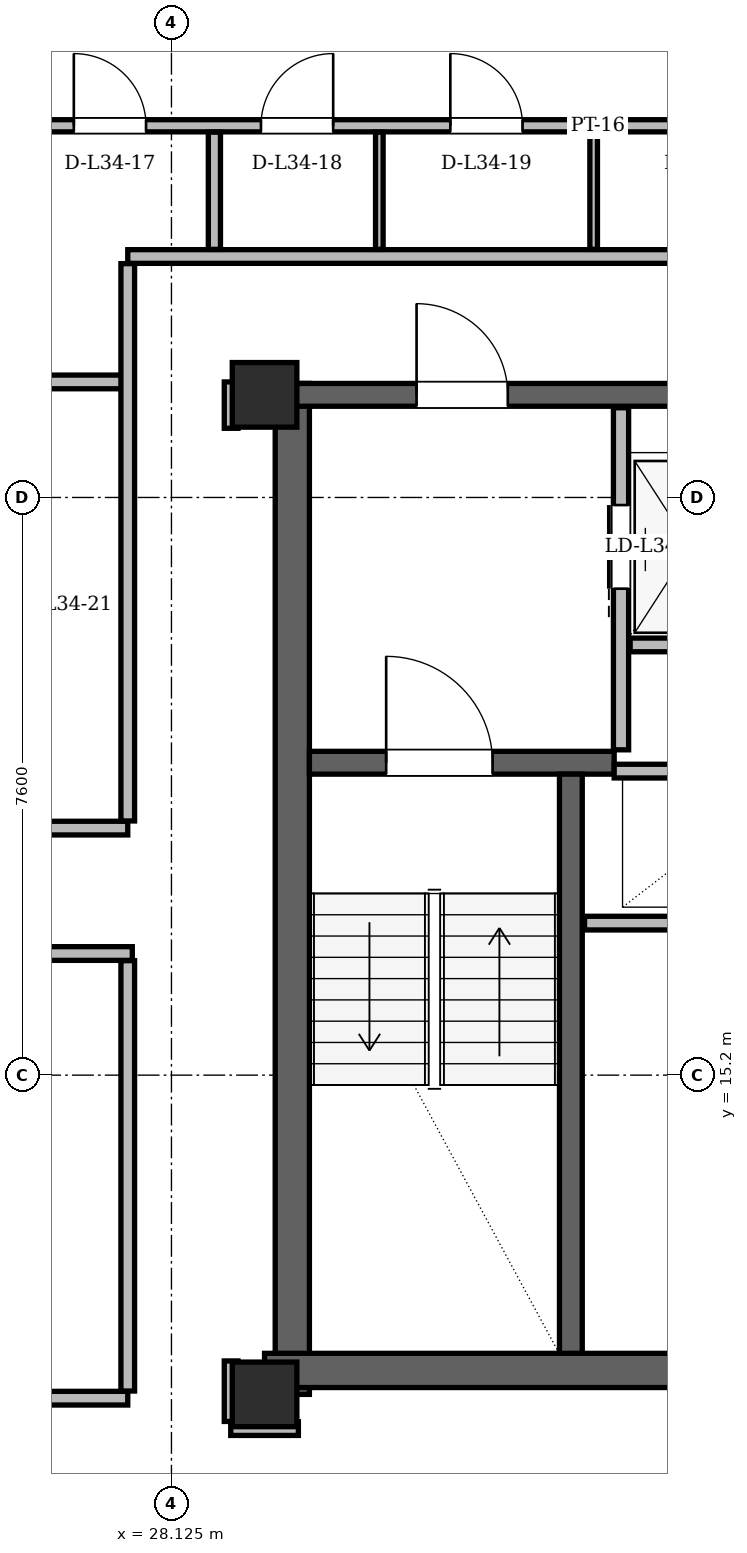
"""IFC4 building model, lengths in metres.
Left out: names, types, materials, properties, quantities, classifications, styles, units other than length and angle.
Written with IfcOpenShell. Run it as: python <this file> out.ifc"""

import sys

from ifc_helpers import new_model, si_unit, direction, frame, frame_2d, origin, origin_2d, place, context, subcontext, project, spatial, rectangle, hollow_rectangle, extrude, element, fill, save


model = new_model("IFC4")
c1 = context("Model", 3, precision=1e-05, world=origin(), true_north=direction((0.0, 1.0)))
c2 = subcontext(c1, "Body", "Model", "MODEL_VIEW")
j1 = project(units=[si_unit("LENGTHUNIT", "METRE"), si_unit("PLANEANGLEUNIT", "RADIAN")], contexts=[c1])
p1 = place(None, origin())
s1 = spatial("IfcSite", under=j1, at=p1, CompositionType="ELEMENT")
p2 = place(p1, origin())
s2 = spatial("IfcBuilding", under=s1, at=p2, CompositionType="ELEMENT")
p3 = place(p2, frame((0.0, 0.0, 130.2)))
s3 = spatial("IfcBuildingStorey", under=s2, at=p3, CompositionType="ELEMENT", Elevation=130.2)
for number, where, z_axis, x_axis in (
    (1, (29.35, 11.0, 0.0), (0.0, 0.0, 1.0), (1.0, 0.0, 0.0)),
    (2, (29.35, 24.15, 0.0), (0.0, 0.0, 1.0), (1.0, 0.0, 0.0)),
):
    element("IfcColumn", number, at=place(p3, frame(where, z_axis=z_axis, x_axis=x_axis)), inside=s3, PredefinedType="COLUMN", context=c2, shape_type="SweptSolid", body=[
        extrude(hollow_rectangle(XDim=0.85, YDim=0.85, WallThickness=0.07, at=origin_2d()), origin(), (0.0, 0.0, 1.0), 3.6),
    ])
p4 = place(p3, frame((29.715, 11.0, 0.0), z_axis=(0.0, 0.0, 1.0), x_axis=(0.0, 1.0, 0.0)))
e3 = element("IfcWall", 3, at=p4, inside=s3, PredefinedType="SHEAR", context=c2, shape_type="SweptSolid", body=[
    extrude(rectangle(XDim=13.3, YDim=0.45, at=frame_2d((6.65, 0.0))), origin(), (0.0, 0.0, 1.0), 3.34),
])
p5 = place(p3, frame((29.35, 11.315, 0.0), z_axis=(0.0, 0.0, 1.0), x_axis=(1.0, 0.0, 0.0)))
e4 = element("IfcWall", 4, at=p5, inside=s3, PredefinedType="SHEAR", context=c2, shape_type="SweptSolid", body=[
    extrude(rectangle(XDim=7.1, YDim=0.45, at=frame_2d((3.55, 0.0))), origin(), (0.0, 0.0, 1.0), 3.34),
])
p6 = place(p3, frame((29.65, 24.15, 0.0), z_axis=(0.0, 0.0, 1.0), x_axis=(1.0, 0.0, 0.0)))
e5 = element("IfcWall", 5, at=p6, inside=s3, PredefinedType="SHEAR", context=c2, shape_type="SweptSolid", body=[
    extrude(rectangle(XDim=15.7, YDim=0.3, at=frame_2d((7.85, 0.0))), origin(), (0.0, 0.0, 1.0), 3.34),
])
p7 = place(p6, frame((1.7, 0.0, 0.0)))
e6 = element("IfcOpeningElement", 6, at=p7, cuts=e5, PredefinedType="OPENING", context=c2, shape_type="SweptSolid", body=[
    extrude(rectangle(XDim=1.2, YDim=2.2, at=frame_2d((0.6, 1.1))), frame((0.0, 0.15, 0.0), z_axis=(0.0, -1.0, 0.0), x_axis=(1.0, 0.0, 0.0)), (0.0, 0.0, 1.0), 0.3),
])
p8 = place(p6, frame((12.8, 0.0, 0.0)))
e7 = element("IfcOpeningElement", 7, at=p8, cuts=e5, PredefinedType="OPENING", context=c2, shape_type="SweptSolid", body=[
    extrude(rectangle(XDim=1.2, YDim=2.2, at=frame_2d((0.6, 1.1))), frame((0.0, 0.15, 0.0), z_axis=(0.0, -1.0, 0.0), x_axis=(1.0, 0.0, 0.0)), (0.0, 0.0, 1.0), 0.3),
])
p9 = place(p6, frame((6.55, 0.0, 0.0)))
e8 = element("IfcOpeningElement", 8, at=p9, cuts=e5, PredefinedType="OPENING", context=c2, shape_type="SweptSolid", body=[
    extrude(rectangle(XDim=0.9, YDim=2.05, at=frame_2d((0.45, 1.025))), frame((0.0, 0.15, 0.0), z_axis=(0.0, -1.0, 0.0), x_axis=(1.0, 0.0, 0.0)), (0.0, 0.0, 1.0), 0.3),
])
p10 = place(p6, frame((8.45, 0.0, 0.0)))
e9 = element("IfcOpeningElement", 9, at=p10, cuts=e5, PredefinedType="OPENING", context=c2, shape_type="SweptSolid", body=[
    extrude(rectangle(XDim=0.9, YDim=2.05, at=frame_2d((0.45, 1.025))), frame((0.0, 0.15, 0.0), z_axis=(0.0, -1.0, 0.0), x_axis=(1.0, 0.0, 0.0)), (0.0, 0.0, 1.0), 0.3),
])
p11 = place(p3, frame((29.94, 19.31, 0.0), z_axis=(0.0, 0.0, 1.0), x_axis=(1.0, 0.0, 0.0)))
e10 = element("IfcWall", 10, at=p11, inside=s3, PredefinedType="SHEAR", context=c2, shape_type="SweptSolid", body=[
    extrude(rectangle(XDim=4.01, YDim=0.3, at=frame_2d((2.005, 0.0))), origin(), (0.0, 0.0, 1.0), 3.34),
])
p12 = place(p11, frame((1.01, 0.0, 0.0)))
e11 = element("IfcOpeningElement", 11, at=p12, cuts=e10, PredefinedType="OPENING", context=c2, shape_type="SweptSolid", body=[
    extrude(rectangle(XDim=1.4, YDim=2.2, at=frame_2d((0.7, 1.1))), frame((0.0, 0.15, 0.0), z_axis=(0.0, -1.0, 0.0), x_axis=(1.0, 0.0, 0.0)), (0.0, 0.0, 1.0), 0.3),
])
p13 = place(p3, frame((33.38, 11.54, 0.0), z_axis=(0.0, 0.0, 1.0), x_axis=(0.0, 1.0, 0.0)))
e12 = element("IfcWall", 12, at=p13, inside=s3, PredefinedType="SHEAR", context=c2, shape_type="SweptSolid", body=[
    extrude(rectangle(XDim=7.62, YDim=0.3, at=frame_2d((3.81, 0.0))), origin(), (0.0, 0.0, 1.0), 3.34),
])
p14 = place(p3, frame((32.303, 43.378, 0.0), z_axis=(0.0, 0.0, 1.0), x_axis=(-0.499999044439, -0.866025955477, 0.0)))
e13 = element("IfcWall", 13, at=p14, inside=s3, PredefinedType="SOLIDWALL", context=c2, shape_type="SweptSolid", body=[
    extrude(rectangle(XDim=35.122, YDim=0.34, at=frame_2d((17.561, 0.0))), origin(), (0.0, 0.0, 1.0), 2.558),
])
p15 = place(p14, frame((8.034, 0.0, 0.0)))
e14 = element("IfcOpeningElement", 14, at=p15, cuts=e13, PredefinedType="OPENING", context=c2, shape_type="SweptSolid", body=[
    extrude(rectangle(XDim=1.5, YDim=2.2, at=frame_2d((0.75, 1.1))), frame((0.0, 0.17, 0.0), z_axis=(0.0, -1.0, 0.0), x_axis=(1.0, 0.0, 0.0)), (0.0, 0.0, 1.0), 0.34),
])
p16 = place(p14, frame((26.832, 0.0, 0.0)))
e15 = element("IfcOpeningElement", 15, at=p16, cuts=e13, PredefinedType="OPENING", context=c2, shape_type="SweptSolid", body=[
    extrude(rectangle(XDim=1.5, YDim=2.2, at=frame_2d((0.75, 1.1))), frame((0.0, 0.17, 0.0), z_axis=(0.0, -1.0, 0.0), x_axis=(1.0, 0.0, 0.0)), (0.0, 0.0, 1.0), 0.34),
])
p17 = place(p14, frame((32.666, 0.0, 0.85)))
e16 = element("IfcOpeningElement", 16, at=p17, cuts=e13, PredefinedType="OPENING", context=c2, shape_type="SweptSolid", body=[
    extrude(rectangle(XDim=1.4, YDim=1.598, at=frame_2d((0.7, 0.799))), frame((0.0, 0.17, 0.0), z_axis=(0.0, -1.0, 0.0), x_axis=(1.0, 0.0, 0.0)), (0.0, 0.0, 1.0), 0.34),
])
p18 = place(p14, frame((22.593, 0.0, 0.85)))
e17 = element("IfcOpeningElement", 17, at=p18, cuts=e13, PredefinedType="OPENING", context=c2, shape_type="SweptSolid", body=[
    extrude(rectangle(XDim=1.2, YDim=1.48, at=frame_2d((0.6, 0.74))), frame((0.0, 0.17, 0.0), z_axis=(0.0, -1.0, 0.0), x_axis=(1.0, 0.0, 0.0)), (0.0, 0.0, 1.0), 0.34),
])
p19 = place(p14, frame((2.413, 0.0, 0.85)))
e18 = element("IfcOpeningElement", 18, at=p19, cuts=e13, PredefinedType="OPENING", context=c2, shape_type="SweptSolid", body=[
    extrude(rectangle(XDim=1.4, YDim=1.598, at=frame_2d((0.7, 0.799))), frame((0.0, 0.17, 0.0), z_axis=(0.0, -1.0, 0.0), x_axis=(1.0, 0.0, 0.0)), (0.0, 0.0, 1.0), 0.34),
])
p20 = place(p14, frame((13.476, 0.0, 0.85)))
e19 = element("IfcOpeningElement", 19, at=p20, cuts=e13, PredefinedType="OPENING", context=c2, shape_type="SweptSolid", body=[
    extrude(rectangle(XDim=2.5, YDim=1.598, at=frame_2d((1.25, 0.799))), frame((0.0, 0.17, 0.0), z_axis=(0.0, -1.0, 0.0), x_axis=(1.0, 0.0, 0.0)), (0.0, 0.0, 1.0), 0.34),
])
p21 = place(p14, frame((18.259, 0.0, 0.85)))
e20 = element("IfcOpeningElement", 20, at=p21, cuts=e13, PredefinedType="OPENING", context=c2, shape_type="SweptSolid", body=[
    extrude(rectangle(XDim=1.2, YDim=1.48, at=frame_2d((0.6, 0.74))), frame((0.0, 0.17, 0.0), z_axis=(0.0, -1.0, 0.0), x_axis=(1.0, 0.0, 0.0)), (0.0, 0.0, 1.0), 0.34),
])
p22 = place(p14, frame((20.455, 0.0, 0.85)))
e21 = element("IfcOpeningElement", 21, at=p22, cuts=e13, PredefinedType="OPENING", context=c2, shape_type="SweptSolid", body=[
    extrude(rectangle(XDim=1.2, YDim=1.48, at=frame_2d((0.6, 0.74))), frame((0.0, 0.17, 0.0), z_axis=(0.0, -1.0, 0.0), x_axis=(1.0, 0.0, 0.0)), (0.0, 0.0, 1.0), 0.34),
])
p23 = place(p3, frame((34.04, 19.48, 0.0), z_axis=(0.0, 0.0, 1.0), x_axis=(0.0, 1.0, 0.0)))
e22 = element("IfcWall", 22, at=p23, inside=s3, PredefinedType="PARTITIONING", context=c2, shape_type="SweptSolid", body=[
    extrude(rectangle(XDim=4.5, YDim=0.2, at=frame_2d((2.25, 0.0))), origin(), (0.0, 0.0, 1.0), 2.38),
])
p24 = place(p23, frame((2.12, 0.0, 0.0)))
e23 = element("IfcOpeningElement", 23, at=p24, cuts=e22, PredefinedType="OPENING", context=c2, shape_type="SweptSolid", body=[
    extrude(rectangle(XDim=1.1, YDim=2.2, at=frame_2d((0.55, 1.1))), frame((0.0, 0.1, 0.0), z_axis=(0.0, -1.0, 0.0), x_axis=(1.0, 0.0, 0.0)), (0.0, 0.0, 1.0), 0.2),
])
p25 = place(p3, frame((34.16, 20.86, 0.0), z_axis=(0.0, 0.0, 1.0), x_axis=(1.0, 0.0, 0.0)))
e24 = element("IfcWall", 24, at=p25, inside=s3, PredefinedType="PARTITIONING", context=c2, shape_type="SweptSolid", body=[
    extrude(rectangle(XDim=1.58, YDim=0.18, at=frame_2d((0.79, 0.0))), origin(), (0.0, 0.0, 1.0), 3.34),
])
p26 = place(p3, frame((33.95, 19.2, 0.0), z_axis=(0.0, 0.0, 1.0), x_axis=(1.0, 0.0, 0.0)))
e25 = element("IfcWall", 25, at=p26, inside=s3, PredefinedType="PARTITIONING", context=c2, shape_type="SweptSolid", body=[
    extrude(rectangle(XDim=2.27, YDim=0.18, at=frame_2d((1.135, 0.0))), origin(), (0.0, 0.0, 1.0), 3.34),
])
p27 = place(p3, frame((33.56, 17.2, 0.0), z_axis=(0.0, 0.0, 1.0), x_axis=(1.0, 0.0, 0.0)))
e26 = element("IfcWall", 26, at=p27, inside=s3, PredefinedType="PARTITIONING", context=c2, shape_type="SweptSolid", body=[
    extrude(rectangle(XDim=2.66, YDim=0.18, at=frame_2d((1.33, 0.0))), origin(), (0.0, 0.0, 1.0), 3.34),
])
p28 = place(p3, frame((28.905, 10.55, 0.0), z_axis=(0.0, 0.0, 1.0), x_axis=(1.0, 0.0, 0.0)))
e27 = element("IfcWall", 27, at=p28, inside=s3, PredefinedType="PARTITIONING", context=c2, shape_type="SweptSolid", body=[
    extrude(rectangle(XDim=0.89, YDim=0.18, at=frame_2d((0.445, 0.0))), origin(), (0.0, 0.0, 1.0), 3.34),
])
p29 = place(p3, frame((19.6, 10.95, 0.0), z_axis=(0.0, 0.0, 1.0), x_axis=(1.0, 0.0, 0.0)))
e28 = element("IfcWall", 28, at=p29, inside=s3, PredefinedType="PARTITIONING", context=c2, shape_type="SweptSolid", body=[
    extrude(rectangle(XDim=7.95, YDim=0.18, at=frame_2d((3.975, 0.0))), origin(), (0.0, 0.0, 1.0), 3.34),
])
p30 = place(p3, frame((17.159, 16.8, 0.0), z_axis=(0.0, 0.0, 1.0), x_axis=(1.0, 0.0, 0.0)))
e29 = element("IfcWall", 29, at=p30, inside=s3, PredefinedType="PARTITIONING", context=c2, shape_type="SweptSolid", body=[
    extrude(rectangle(XDim=10.451, YDim=0.18, at=frame_2d((5.226, 0.0))), origin(), (0.0, 0.0, 1.0), 3.34),
])
p31 = place(p3, frame((18.111, 18.45, 0.0), z_axis=(0.0, 0.0, 1.0), x_axis=(1.0, 0.0, 0.0)))
e30 = element("IfcWall", 30, at=p31, inside=s3, PredefinedType="PARTITIONING", context=c2, shape_type="SweptSolid", body=[
    extrude(rectangle(XDim=9.439, YDim=0.18, at=frame_2d((4.719, 0.0))), origin(), (0.0, 0.0, 1.0), 3.34),
])
p32 = place(p31, frame((2.618, 0.0, 0.0)))
e31 = element("IfcOpeningElement", 31, at=p32, cuts=e30, PredefinedType="OPENING", context=c2, shape_type="SweptSolid", body=[
    extrude(rectangle(XDim=1.0, YDim=2.18, at=frame_2d((0.5, 1.09))), frame((0.0, 0.09, 0.0), z_axis=(0.0, -1.0, 0.0), x_axis=(1.0, 0.0, 0.0)), (0.0, 0.0, 1.0), 0.18),
])
p33 = place(p3, frame((21.5, 24.32, 0.0), z_axis=(0.0, 0.0, 1.0), x_axis=(1.0, 0.0, 0.0)))
e32 = element("IfcWall", 32, at=p33, inside=s3, PredefinedType="PARTITIONING", context=c2, shape_type="SweptSolid", body=[
    extrude(rectangle(XDim=6.11, YDim=0.18, at=frame_2d((3.055, 0.0))), origin(), (0.0, 0.0, 1.0), 3.34),
])
p34 = place(p3, frame((27.55, 25.97, 0.0), z_axis=(0.0, 0.0, 1.0), x_axis=(1.0, 0.0, 0.0)))
e33 = element("IfcWall", 33, at=p34, inside=s3, PredefinedType="PARTITIONING", context=c2, shape_type="SweptSolid", body=[
    extrude(rectangle(XDim=9.15, YDim=0.18, at=frame_2d((4.575, 0.0))), origin(), (0.0, 0.0, 1.0), 2.794),
])
p35 = place(p3, frame((23.446, 27.69, 0.0), z_axis=(0.0, 0.0, 1.0), x_axis=(1.0, 0.0, 0.0)))
e34 = element("IfcWall", 34, at=p35, inside=s3, PredefinedType="PARTITIONING", context=c2, shape_type="SweptSolid", body=[
    extrude(rectangle(XDim=13.304, YDim=0.16, at=frame_2d((6.652, 0.0))), origin(), (0.0, 0.0, 1.0), 2.794),
])
p36 = place(p35, frame((0.777, 0.0, 0.0)))
e35 = element("IfcOpeningElement", 35, at=p36, cuts=e34, PredefinedType="OPENING", context=c2, shape_type="SweptSolid", body=[
    extrude(rectangle(XDim=0.88, YDim=2.08, at=frame_2d((0.44, 1.04))), frame((0.0, 0.08, 0.0), z_axis=(0.0, -1.0, 0.0), x_axis=(1.0, 0.0, 0.0)), (0.0, 0.0, 1.0), 0.16),
])
p37 = place(p35, frame((3.394, 0.0, 0.0)))
e36 = element("IfcOpeningElement", 36, at=p37, cuts=e34, PredefinedType="OPENING", context=c2, shape_type="SweptSolid", body=[
    extrude(rectangle(XDim=0.95, YDim=2.1, at=frame_2d((0.475, 1.05))), frame((0.0, 0.08, 0.0), z_axis=(0.0, -1.0, 0.0), x_axis=(1.0, 0.0, 0.0)), (0.0, 0.0, 1.0), 0.16),
])
p38 = place(p35, frame((5.857, 0.0, 0.0)))
e37 = element("IfcOpeningElement", 37, at=p38, cuts=e34, PredefinedType="OPENING", context=c2, shape_type="SweptSolid", body=[
    extrude(rectangle(XDim=0.95, YDim=2.1, at=frame_2d((0.475, 1.05))), frame((0.0, 0.08, 0.0), z_axis=(0.0, -1.0, 0.0), x_axis=(1.0, 0.0, 0.0)), (0.0, 0.0, 1.0), 0.16),
])
p39 = place(p35, frame((8.348, 0.0, 0.0)))
e38 = element("IfcOpeningElement", 38, at=p39, cuts=e34, PredefinedType="OPENING", context=c2, shape_type="SweptSolid", body=[
    extrude(rectangle(XDim=0.95, YDim=2.1, at=frame_2d((0.475, 1.05))), frame((0.0, 0.08, 0.0), z_axis=(0.0, -1.0, 0.0), x_axis=(1.0, 0.0, 0.0)), (0.0, 0.0, 1.0), 0.16),
])
p40 = place(p35, frame((11.282, 0.0, 0.0)))
e39 = element("IfcOpeningElement", 39, at=p40, cuts=e34, PredefinedType="OPENING", context=c2, shape_type="SweptSolid", body=[
    extrude(rectangle(XDim=0.95, YDim=2.1, at=frame_2d((0.475, 1.05))), frame((0.0, 0.08, 0.0), z_axis=(0.0, -1.0, 0.0), x_axis=(1.0, 0.0, 0.0)), (0.0, 0.0, 1.0), 0.16),
])
p41 = place(p3, frame((27.55, 11.044, 0.0), z_axis=(0.0, 0.0, 1.0), x_axis=(0.0, 1.0, 0.0)))
e40 = element("IfcWall", 40, at=p41, inside=s3, PredefinedType="PARTITIONING", context=c2, shape_type="SweptSolid", body=[
    extrude(rectangle(XDim=5.662, YDim=0.18, at=frame_2d((2.831, 0.0))), origin(), (0.0, 0.0, 1.0), 2.794),
])
p42 = place(p3, frame((27.55, 18.544, 0.0), z_axis=(0.0, 0.0, 1.0), x_axis=(0.0, 1.0, 0.0)))
e41 = element("IfcWall", 41, at=p42, inside=s3, PredefinedType="PARTITIONING", context=c2, shape_type="SweptSolid", body=[
    extrude(rectangle(XDim=7.332, YDim=0.18, at=frame_2d((3.666, 0.0))), origin(), (0.0, 0.0, 1.0), 3.34),
])
p43 = place(p3, frame((28.69, 26.064, 0.0), z_axis=(0.0, 0.0, 1.0), x_axis=(0.0, 1.0, 0.0)))
e42 = element("IfcWall", 42, at=p43, inside=s3, PredefinedType="PARTITIONING", context=c2, shape_type="SweptSolid", body=[
    extrude(rectangle(XDim=1.542, YDim=0.16, at=frame_2d((0.771, 0.0))), origin(), (0.0, 0.0, 1.0), 3.34),
])
p44 = place(p3, frame((28.91, 10.644, 0.0), z_axis=(0.0, 0.0, 1.0), x_axis=(0.0, 1.0, 0.0)))
e43 = element("IfcWall", 43, at=p44, inside=s3, PredefinedType="PARTITIONING", context=c2, shape_type="SweptSolid", body=[
    extrude(rectangle(XDim=0.796, YDim=0.18, at=frame_2d((0.398, 0.0))), origin(), (0.0, 0.0, 1.0), 2.794),
])
p45 = place(p3, frame((28.91, 23.71, 0.0), z_axis=(0.0, 0.0, 1.0), x_axis=(0.0, 1.0, 0.0)))
e44 = element("IfcWall", 44, at=p45, inside=s3, PredefinedType="PARTITIONING", context=c2, shape_type="SweptSolid", body=[
    extrude(rectangle(XDim=0.61, YDim=0.18, at=frame_2d((0.305, 0.0))), origin(), (0.0, 0.0, 1.0), 3.34),
])
for number, where, z_axis, x_axis in (
    (45, (30.86, 26.064, 0.0), (0.0, 0.0, 1.0), (0.0, 1.0, 0.0)),
    (46, (33.68, 26.064, 0.0), (0.0, 0.0, 1.0), (0.0, 1.0, 0.0)),
):
    element("IfcWall", number, at=place(p3, frame(where, z_axis=z_axis, x_axis=x_axis)), inside=s3, PredefinedType="PARTITIONING", context=c2, shape_type="SweptSolid", body=[
        extrude(rectangle(XDim=1.542, YDim=0.1, at=frame_2d((0.771, 0.0))), origin(), (0.0, 0.0, 1.0), 3.34),
    ])
p46 = place(p24, origin())
e47 = element("IfcDoor", 47, at=p46, inside=s3, OperationType="SLIDING_TO_LEFT", PredefinedType="DOOR", context=c2, shape_type="SweptSolid", body=[
    extrude(rectangle(XDim=1.1, YDim=2.2, at=frame_2d((0.55, 1.1))), frame((0.0, 0.025, 0.0), z_axis=(0.0, -1.0, 0.0), x_axis=(1.0, 0.0, 0.0)), (0.0, 0.0, 1.0), 0.05),
])
fill(e23, e47)
p47 = place(p12, origin())
e48 = element("IfcDoor", 48, at=p47, inside=s3, OperationType="SINGLE_SWING_LEFT", PredefinedType="DOOR", context=c2, shape_type="SweptSolid", body=[
    extrude(rectangle(XDim=1.4, YDim=2.2, at=frame_2d((0.7, 1.1))), frame((0.0, 0.025, 0.0), z_axis=(0.0, -1.0, 0.0), x_axis=(1.0, 0.0, 0.0)), (0.0, 0.0, 1.0), 0.05),
])
fill(e11, e48)
p48 = place(p7, origin())
e49 = element("IfcDoor", 49, at=p48, inside=s3, OperationType="SINGLE_SWING_LEFT", PredefinedType="DOOR", context=c2, shape_type="SweptSolid", body=[
    extrude(rectangle(XDim=1.2, YDim=2.2, at=frame_2d((0.6, 1.1))), frame((0.0, 0.025, 0.0), z_axis=(0.0, -1.0, 0.0), x_axis=(1.0, 0.0, 0.0)), (0.0, 0.0, 1.0), 0.05),
])
fill(e6, e49)
p49 = place(p37, origin())
e50 = element("IfcDoor", 50, at=p49, inside=s3, OperationType="SINGLE_SWING_LEFT", PredefinedType="DOOR", context=c2, shape_type="SweptSolid", body=[
    extrude(rectangle(XDim=0.95, YDim=2.1, at=frame_2d((0.475, 1.05))), frame((0.0, 0.025, 0.0), z_axis=(0.0, -1.0, 0.0), x_axis=(1.0, 0.0, 0.0)), (0.0, 0.0, 1.0), 0.05),
])
fill(e36, e50)
p50 = place(p38, origin())
e51 = element("IfcDoor", 51, at=p50, inside=s3, OperationType="SINGLE_SWING_RIGHT", PredefinedType="DOOR", context=c2, shape_type="SweptSolid", body=[
    extrude(rectangle(XDim=0.95, YDim=2.1, at=frame_2d((0.475, 1.05))), frame((0.0, 0.025, 0.0), z_axis=(0.0, -1.0, 0.0), x_axis=(1.0, 0.0, 0.0)), (0.0, 0.0, 1.0), 0.05),
])
fill(e37, e51)
p51 = place(p39, origin())
e52 = element("IfcDoor", 52, at=p51, inside=s3, OperationType="SINGLE_SWING_LEFT", PredefinedType="DOOR", context=c2, shape_type="SweptSolid", body=[
    extrude(rectangle(XDim=0.95, YDim=2.1, at=frame_2d((0.475, 1.05))), frame((0.0, 0.025, 0.0), z_axis=(0.0, -1.0, 0.0), x_axis=(1.0, 0.0, 0.0)), (0.0, 0.0, 1.0), 0.05),
])
fill(e38, e52)
save(model, sys.argv[1])
